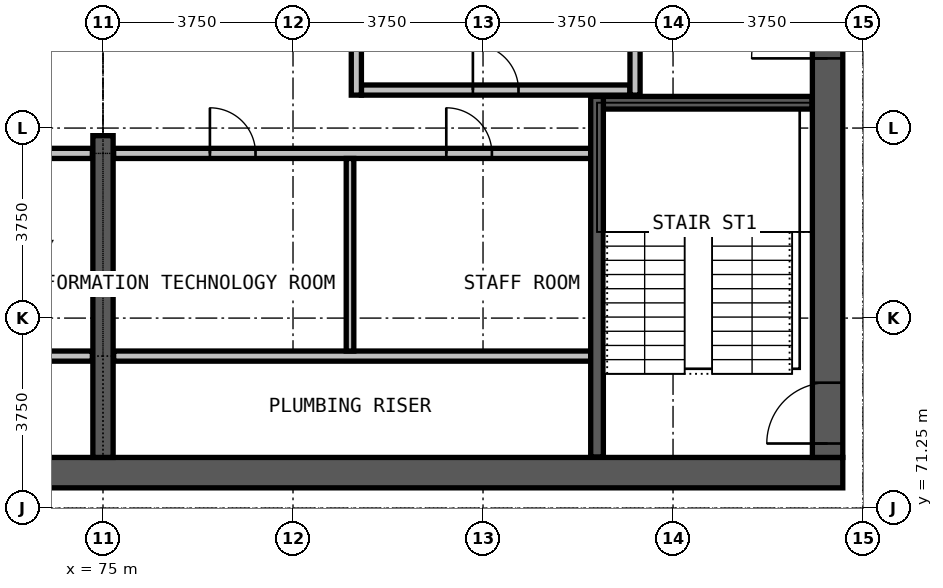
"""IFC4 building model, lengths in metres.
Left out: names, types, materials, properties, quantities, classifications, styles, units other than length and angle.
Written with IfcOpenShell. Run it as: python <this file> out.ifc"""

import sys

from ifc_helpers import new_model, si_unit, direction, frame, frame_2d, origin, place, context, subcontext, project, spatial, rectangle, extrude, element, fill, save


model = new_model("IFC4")
c1 = context("Model", 3, precision=1e-05, world=origin(), true_north=direction((0.0, 1.0)))
c2 = subcontext(c1, "Body", "Model", "MODEL_VIEW")
j1 = project(units=[si_unit("LENGTHUNIT", "METRE"), si_unit("PLANEANGLEUNIT", "RADIAN")], contexts=[c1])
p1 = place(None, origin())
s1 = spatial("IfcSite", under=j1, at=p1, CompositionType="ELEMENT")
p2 = place(p1, origin())
s2 = spatial("IfcBuilding", under=s1, at=p2, CompositionType="ELEMENT")
p3 = place(p2, frame((0.0, 0.0, 221.1)))
s3 = spatial("IfcBuildingStorey", under=s2, at=p3, CompositionType="ELEMENT", Elevation=221.1)
p4 = place(p3, frame((60.4, 71.95, 0.0), z_axis=(0.0, 0.0, 1.0), x_axis=(1.0, 0.0, 0.0)))
e1 = element("IfcWall", 1, at=p4, inside=s3, PredefinedType="SHEAR", context=c2, shape_type="SweptSolid", body=[
    extrude(rectangle(XDim=29.2, YDim=0.6, at=frame_2d((14.6, 0.0))), origin(), (0.0, 0.0, 1.0), 3.6),
])
p5 = place(p3, frame((89.3, 72.25, 0.0), z_axis=(0.0, 0.0, 1.0), x_axis=(0.0, 1.0, 0.0)))
e2 = element("IfcWall", 2, at=p5, inside=s3, PredefinedType="SHEAR", context=c2, shape_type="SweptSolid", body=[
    extrude(rectangle(XDim=20.5, YDim=0.6, at=frame_2d((10.25, 0.0))), origin(), (0.0, 0.0, 1.0), 3.6),
])
p6 = place(p5, frame((0.275, 0.0, 0.0)))
e3 = element("IfcOpeningElement", 3, at=p6, cuts=e2, PredefinedType="OPENING", context=c2, shape_type="SweptSolid", body=[
    extrude(rectangle(XDim=1.2, YDim=2.2, at=frame_2d((0.6, 1.1))), frame((0.0, 0.31, 0.0), z_axis=(0.0, -1.0, 0.0), x_axis=(1.0, 0.0, 0.0)), (0.0, 0.0, 1.0), 0.62),
])
p7 = place(p5, frame((13.775, 0.0, 0.0)))
e4 = element("IfcOpeningElement", 4, at=p7, cuts=e2, PredefinedType="OPENING", context=c2, shape_type="SweptSolid", body=[
    extrude(rectangle(XDim=1.2, YDim=2.2, at=frame_2d((0.6, 1.1))), frame((0.0, 0.31, 0.0), z_axis=(0.0, -1.0, 0.0), x_axis=(1.0, 0.0, 0.0)), (0.0, 0.0, 1.0), 0.62),
])
p8 = place(p5, frame((7.875, 0.0, 0.0)))
e5 = element("IfcOpeningElement", 5, at=p8, cuts=e2, PredefinedType="OPENING", context=c2, shape_type="SweptSolid", body=[
    extrude(rectangle(XDim=1.5, YDim=2.2, at=frame_2d((0.75, 1.1))), frame((0.0, 0.31, 0.0), z_axis=(0.0, -1.0, 0.0), x_axis=(1.0, 0.0, 0.0)), (0.0, 0.0, 1.0), 0.62),
])
p9 = place(p3, frame((75.0, 72.25, 0.0), z_axis=(0.0, 0.0, 1.0), x_axis=(0.0, 1.0, 0.0)))
e6 = element("IfcWall", 6, at=p9, inside=s3, PredefinedType="SHEAR", context=c2, shape_type="SweptSolid", body=[
    extrude(rectangle(XDim=6.35, YDim=0.4, at=frame_2d((3.175, 0.0))), origin(), (0.0, 0.0, 1.0), 3.6),
])
for number, where, z_axis, x_axis in (
    (7, (65.375, 74.25, 0.0), (0.0, 0.0, 1.0), (1.0, 0.0, 0.0)),
    (8, (75.21, 74.25, 0.0), (0.0, 0.0, 1.0), (1.0, 0.0, 0.0)),
):
    element("IfcWall", number, at=place(p3, frame(where, z_axis=z_axis, x_axis=x_axis)), inside=s3, PredefinedType="PARTITIONING", context=c2, shape_type="SweptSolid", body=[
        extrude(rectangle(XDim=9.415, YDim=0.2, at=frame_2d((4.708, 0.0))), origin(), (0.0, 0.0, 1.0), 3.3),
    ])
p10 = place(p3, frame((65.375, 78.25, 0.0), z_axis=(0.0, 0.0, 1.0), x_axis=(1.0, 0.0, 0.0)))
e9 = element("IfcWall", 9, at=p10, inside=s3, PredefinedType="PARTITIONING", context=c2, shape_type="SweptSolid", body=[
    extrude(rectangle(XDim=9.415, YDim=0.2, at=frame_2d((4.708, 0.0))), origin(), (0.0, 0.0, 1.0), 3.3),
])
p11 = place(p10, frame((1.0, 0.0, 0.0)))
e10 = element("IfcOpeningElement", 10, at=p11, cuts=e9, PredefinedType="OPENING", context=c2, shape_type="SweptSolid", body=[
    extrude(rectangle(XDim=0.9, YDim=2.2, at=frame_2d((0.45, 1.1))), frame((0.0, 0.11, 0.0), z_axis=(0.0, -1.0, 0.0), x_axis=(1.0, 0.0, 0.0)), (0.0, 0.0, 1.0), 0.22),
])
p12 = place(p10, frame((5.665, 0.0, 0.0)))
e11 = element("IfcOpeningElement", 11, at=p12, cuts=e9, PredefinedType="OPENING", context=c2, shape_type="SweptSolid", body=[
    extrude(rectangle(XDim=0.9, YDim=2.2, at=frame_2d((0.45, 1.1))), frame((0.0, 0.11, 0.0), z_axis=(0.0, -1.0, 0.0), x_axis=(1.0, 0.0, 0.0)), (0.0, 0.0, 1.0), 0.22),
])
p13 = place(p3, frame((75.21, 78.25, 0.0), z_axis=(0.0, 0.0, 1.0), x_axis=(1.0, 0.0, 0.0)))
e12 = element("IfcWall", 12, at=p13, inside=s3, PredefinedType="PARTITIONING", context=c2, shape_type="SweptSolid", body=[
    extrude(rectangle(XDim=9.415, YDim=0.2, at=frame_2d((4.708, 0.0))), origin(), (0.0, 0.0, 1.0), 3.3),
])
p14 = place(p13, frame((1.9, 0.0, 0.0)))
e13 = element("IfcOpeningElement", 13, at=p14, cuts=e12, PredefinedType="OPENING", context=c2, shape_type="SweptSolid", body=[
    extrude(rectangle(XDim=0.9, YDim=2.2, at=frame_2d((0.45, 1.1))), frame((0.0, 0.11, 0.0), z_axis=(0.0, -1.0, 0.0), x_axis=(1.0, 0.0, 0.0)), (0.0, 0.0, 1.0), 0.22),
])
p15 = place(p13, frame((6.565, 0.0, 0.0)))
e14 = element("IfcOpeningElement", 14, at=p15, cuts=e12, PredefinedType="OPENING", context=c2, shape_type="SweptSolid", body=[
    extrude(rectangle(XDim=0.9, YDim=2.2, at=frame_2d((0.45, 1.1))), frame((0.0, 0.11, 0.0), z_axis=(0.0, -1.0, 0.0), x_axis=(1.0, 0.0, 0.0)), (0.0, 0.0, 1.0), 0.22),
])
p16 = place(p3, frame((80.1, 79.5, 0.0), z_axis=(0.0, 0.0, 1.0), x_axis=(1.0, 0.0, 0.0)))
e15 = element("IfcWall", 15, at=p16, inside=s3, PredefinedType="PARTITIONING", context=c2, shape_type="SweptSolid", body=[
    extrude(rectangle(XDim=5.3, YDim=0.2, at=frame_2d((2.65, 0.0))), origin(), (0.0, 0.0, 1.0), 3.3),
])
p17 = place(p16, frame((2.2, 0.0, 0.0)))
e16 = element("IfcOpeningElement", 16, at=p17, cuts=e15, PredefinedType="OPENING", context=c2, shape_type="SweptSolid", body=[
    extrude(rectangle(XDim=0.9, YDim=2.2, at=frame_2d((0.45, 1.1))), frame((0.0, 0.11, 0.0), z_axis=(0.0, -1.0, 0.0), x_axis=(1.0, 0.0, 0.0)), (0.0, 0.0, 1.0), 0.22),
])
for number, where, z_axis, x_axis in (
    (17, (80.0, 79.4, 0.0), (0.0, 0.0, 1.0), (0.0, 1.0, 0.0)),
    (18, (85.5, 79.4, 0.0), (0.0, 0.0, 1.0), (0.0, 1.0, 0.0)),
):
    element("IfcWall", number, at=place(p3, frame(where, z_axis=z_axis, x_axis=x_axis)), inside=s3, PredefinedType="PARTITIONING", context=c2, shape_type="SweptSolid", body=[
        extrude(rectangle(XDim=2.89, YDim=0.2, at=frame_2d((1.445, 0.0))), origin(), (0.0, 0.0, 1.0), 3.3),
    ])
p18 = place(p3, frame((79.875, 74.35, 0.0), z_axis=(0.0, 0.0, 1.0), x_axis=(0.0, 1.0, 0.0)))
e19 = element("IfcWall", 19, at=p18, inside=s3, PredefinedType="PARTITIONING", context=c2, shape_type="SweptSolid", body=[
    extrude(rectangle(XDim=3.8, YDim=0.15, at=frame_2d((1.9, 0.0))), origin(), (0.0, 0.0, 1.0), 3.3),
])
p19 = place(p3, frame((84.875, 79.25, 0.0), z_axis=(0.0, 0.0, 1.0), x_axis=(1.0, 0.0, 0.0)))
e20 = element("IfcWall", 20, at=p19, inside=s3, PredefinedType="PARTITIONING", context=c2, shape_type="SweptSolid", body=[
    extrude(rectangle(XDim=4.115, YDim=0.25, at=frame_2d((2.058, 0.0))), origin(), (0.0, 0.0, 1.0), 3.3),
])
p20 = place(p3, frame((84.75, 72.26, 0.0), z_axis=(0.0, 0.0, 1.0), x_axis=(0.0, 1.0, 0.0)))
e21 = element("IfcWall", 21, at=p20, inside=s3, PredefinedType="PARTITIONING", context=c2, shape_type="SweptSolid", body=[
    extrude(rectangle(XDim=7.115, YDim=0.25, at=frame_2d((3.558, 0.0))), origin(), (0.0, 0.0, 1.0), 3.3),
])
p21 = place(p6, origin())
e22 = element("IfcDoor", 22, at=p21, inside=s3, OperationType="SINGLE_SWING_RIGHT", PredefinedType="DOOR", context=c2, shape_type="SweptSolid", body=[
    extrude(rectangle(XDim=1.2, YDim=2.2, at=frame_2d((0.6, 1.1))), frame((0.0, 0.025, 0.0), z_axis=(0.0, -1.0, 0.0), x_axis=(1.0, 0.0, 0.0)), (0.0, 0.0, 1.0), 0.05),
])
fill(e3, e22)
p22 = place(p8, origin())
e23 = element("IfcDoor", 23, at=p22, inside=s3, OperationType="DOUBLE_DOOR_SINGLE_SWING", PredefinedType="DOOR", context=c2, shape_type="SweptSolid", body=[
    extrude(rectangle(XDim=1.5, YDim=2.2, at=frame_2d((0.75, 1.1))), frame((0.0, 0.025, 0.0), z_axis=(0.0, -1.0, 0.0), x_axis=(1.0, 0.0, 0.0)), (0.0, 0.0, 1.0), 0.05),
])
fill(e5, e23)
p23 = place(p17, origin())
e24 = element("IfcDoor", 24, at=p23, inside=s3, OperationType="SINGLE_SWING_LEFT", PredefinedType="DOOR", context=c2, shape_type="SweptSolid", body=[
    extrude(rectangle(XDim=0.9, YDim=2.2, at=frame_2d((0.45, 1.1))), frame((0.0, 0.025, 0.0), z_axis=(0.0, -1.0, 0.0), x_axis=(1.0, 0.0, 0.0)), (0.0, 0.0, 1.0), 0.05),
])
fill(e16, e24)
p24 = place(p14, origin())
e25 = element("IfcDoor", 25, at=p24, inside=s3, OperationType="SINGLE_SWING_RIGHT", PredefinedType="DOOR", context=c2, shape_type="SweptSolid", body=[
    extrude(rectangle(XDim=0.9, YDim=2.2, at=frame_2d((0.45, 1.1))), frame((0.0, 0.025, 0.0), z_axis=(0.0, -1.0, 0.0), x_axis=(1.0, 0.0, 0.0)), (0.0, 0.0, 1.0), 0.05),
])
fill(e13, e25)
p25 = place(p15, origin())
e26 = element("IfcDoor", 26, at=p25, inside=s3, OperationType="SINGLE_SWING_LEFT", PredefinedType="DOOR", context=c2, shape_type="SweptSolid", body=[
    extrude(rectangle(XDim=0.9, YDim=2.2, at=frame_2d((0.45, 1.1))), frame((0.0, 0.025, 0.0), z_axis=(0.0, -1.0, 0.0), x_axis=(1.0, 0.0, 0.0)), (0.0, 0.0, 1.0), 0.05),
])
fill(e14, e26)
save(model, sys.argv[1])
